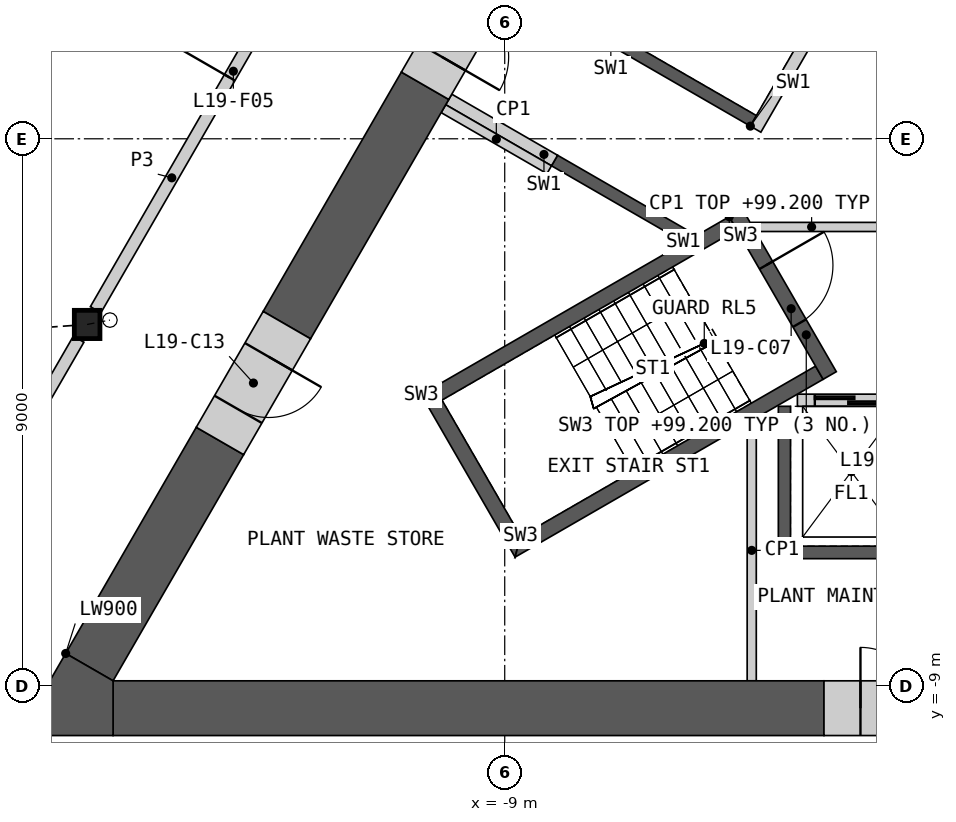
"""IFC4 building model, lengths in metres.
Left out: names, types, materials, properties, quantities, classifications, styles, units other than length and angle.
Written with IfcOpenShell. Run it as: python <this file> out.ifc"""

import sys

from ifc_helpers import new_model, si_unit, direction, frame, frame_2d, origin, origin_2d, place, context, subcontext, project, spatial, polyline, rectangle, i_section, outline, extrude, element, fill, save


model = new_model("IFC4")
c1 = context("Model", 3, precision=1e-05, world=origin(), true_north=direction((0.0, 1.0)))
c2 = subcontext(c1, "Body", "Model", "MODEL_VIEW")
j1 = project(units=[si_unit("LENGTHUNIT", "METRE"), si_unit("PLANEANGLEUNIT", "RADIAN")], contexts=[c1])
p1 = place(None, origin())
s1 = spatial("IfcSite", under=j1, at=p1, CompositionType="ELEMENT")
p2 = place(p1, origin())
s2 = spatial("IfcBuilding", under=s1, at=p2, CompositionType="ELEMENT")
p3 = place(p2, frame((0.0, 0.0, 94.6)))
s3 = spatial("IfcBuildingStorey", under=s2, at=p3, CompositionType="ELEMENT", Elevation=94.6)
p4 = place(p3, frame((-15.868, -3.054, 0.0), z_axis=(0.074782233985, 0.014362473324, 0.997096453128), x_axis=(-0.188610251533, 0.982052021543, 0.0)))
e1 = element("IfcColumn", 1, at=p4, inside=s3, PredefinedType="COLUMN", context=c2, shape_type="SweptSolid", body=[
    extrude(i_section(OverallWidth=0.421, OverallDepth=0.465, WebThickness=0.045, FlangeThickness=0.072, at=origin_2d()), frame((0.0, 0.0, 0.018)), (0.0, 0.0, 1.0), 4.979),
])
p5 = place(p3, origin())
e2 = element("IfcWall", 2, at=p5, inside=s3, PredefinedType="SHEAR", context=c2, shape_type="SweptSolid", body=[
    extrude(outline(polyline([(4.5, -4.4), (4.5, -6.906), (-4.5, -6.906), (-4.5, -4.4), (-4.3, -4.4), (-4.3, -6.7), (-2.3, -6.7), (-2.3, -4.4), (-2.1, -4.4), (-2.1, -6.7), (-0.1, -6.7), (-0.1, -4.4), (0.1, -4.4), (0.1, -6.7), (2.1, -6.7), (2.1, -4.4), (2.3, -4.4), (2.3, -6.7), (4.3, -6.7), (4.3, -4.4), (4.5, -4.4)])), origin(), (0.0, 0.0, 1.0), 4.6),
])
p6 = place(p3, frame((-4.187, -4.3, 0.0), z_axis=(0.0, 0.0, 1.0), x_axis=(1.0, 0.0, 0.0)))
e3 = element("IfcWall", 3, at=p6, inside=s3, PredefinedType="SOLIDWALL", context=c2, shape_type="SweptSolid", body=[
    extrude(rectangle(XDim=8.373, YDim=0.2, at=frame_2d((4.187, 0.0))), origin(), (0.0, 0.0, 1.0), 4.6),
])
p7 = place(p6, frame((0.287, 0.0, 0.0)))
e4 = element("IfcOpeningElement", 4, at=p7, cuts=e3, PredefinedType="OPENING", context=c2, shape_type="SweptSolid", body=[
    extrude(rectangle(XDim=1.2, YDim=2.1, at=frame_2d((0.6, 1.05))), frame((0.0, 0.11, 0.0), z_axis=(0.0, -1.0, 0.0), x_axis=(1.0, 0.0, 0.0)), (0.0, 0.0, 1.0), 0.22),
])
p8 = place(p6, frame((2.387, 0.0, 0.0)))
e5 = element("IfcOpeningElement", 5, at=p8, cuts=e3, PredefinedType="OPENING", context=c2, shape_type="SweptSolid", body=[
    extrude(rectangle(XDim=1.4, YDim=2.1, at=frame_2d((0.7, 1.05))), frame((0.0, 0.11, 0.0), z_axis=(0.0, -1.0, 0.0), x_axis=(1.0, 0.0, 0.0)), (0.0, 0.0, 1.0), 0.22),
])
p9 = place(p6, frame((6.887, 0.0, 0.0)))
e6 = element("IfcOpeningElement", 6, at=p9, cuts=e3, PredefinedType="OPENING", context=c2, shape_type="SweptSolid", body=[
    extrude(rectangle(XDim=1.2, YDim=2.1, at=frame_2d((0.6, 1.05))), frame((0.0, 0.11, 0.0), z_axis=(0.0, -1.0, 0.0), x_axis=(1.0, 0.0, 0.0)), (0.0, 0.0, 1.0), 0.22),
])
p10 = place(p3, origin())
e7 = element("IfcWall", 7, at=p10, inside=s3, PredefinedType="SHEAR", context=c2, shape_type="SweptSolid", body=[
    extrude(outline(polyline([(-6.061, -1.697), (-8.231, -0.444), (-8.131, -0.271), (-5.96, -1.524), (-6.061, -1.697)])), origin(), (0.0, 0.0, 1.0), 4.6),
])
p11 = place(p3, origin())
e8 = element("IfcWall", 8, at=p11, inside=s3, PredefinedType="SHEAR", context=c2, shape_type="SweptSolid", body=[
    extrude(outline(polyline([(-4.96, 0.208), (-7.131, 1.461), (-3.731, 7.35), (-1.561, 6.097), (-1.66, 5.924), (-3.652, 7.074), (-5.752, 3.437), (-3.76, 2.287), (-3.861, 2.113), (-5.852, 3.263), (-6.852, 1.531), (-4.861, 0.381), (-4.96, 0.208)])), origin(), (0.0, 0.0, 1.0), 4.6),
])
p12 = place(p3, frame((-1.631, 5.776, 0.0), z_axis=(0.0, 0.0, 1.0), x_axis=(-0.499992876559, -0.866029516466, 0.0)))
e9 = element("IfcWall", 9, at=p12, inside=s3, PredefinedType="SOLIDWALL", context=c2, shape_type="SweptSolid", body=[
    extrude(rectangle(XDim=6.486, YDim=0.2, at=frame_2d((3.243, 0.0))), origin(), (0.0, 0.0, 1.0), 4.6),
])
p13 = place(p12, frame((1.537, 0.0, 0.0)))
e10 = element("IfcOpeningElement", 10, at=p13, cuts=e9, PredefinedType="OPENING", context=c2, shape_type="SweptSolid", body=[
    extrude(rectangle(XDim=0.9, YDim=2.1, at=frame_2d((0.45, 1.05))), frame((0.0, 0.11, 0.0), z_axis=(0.0, -1.0, 0.0), x_axis=(1.0, 0.0, 0.0)), (0.0, 0.0, 1.0), 0.22),
])
p14 = place(p3, frame((-8.181, -0.357, 0.0), z_axis=(0.0, 0.0, 1.0), x_axis=(-0.866035824272, 0.499981950752, 0.0)))
e11 = element("IfcWall", 11, at=p14, inside=s3, PredefinedType="SHEAR", context=c2, shape_type="SweptSolid", body=[
    extrude(rectangle(XDim=2.009, YDim=0.2, at=frame_2d((1.004, 0.0))), origin(), (0.0, 0.0, 1.0), 4.6),
])
p15 = place(p3, frame((-4.941, -1.45, 0.0), z_axis=(0.0, 0.0, 1.0), x_axis=(1.0, 0.0, 0.0)))
e12 = element("IfcWall", 12, at=p15, inside=s3, PredefinedType="PARTITIONING", context=c2, shape_type="SweptSolid", body=[
    extrude(rectangle(XDim=9.882, YDim=0.15, at=frame_2d((4.941, 0.0))), origin(), (0.0, 0.0, 1.0), 4.6),
])
p16 = place(p15, frame((4.391, 0.0, 0.0)))
e13 = element("IfcOpeningElement", 13, at=p16, cuts=e12, PredefinedType="OPENING", context=c2, shape_type="SweptSolid", body=[
    extrude(rectangle(XDim=1.1, YDim=2.1, at=frame_2d((0.55, 1.05))), frame((0.0, 0.085, 0.0), z_axis=(0.0, -1.0, 0.0), x_axis=(1.0, 0.0, 0.0)), (0.0, 0.0, 1.0), 0.17),
])
p17 = place(p3, origin())
e14 = element("IfcWall", 14, at=p17, inside=s3, PredefinedType="SHEAR", context=c2, shape_type="SweptSolid", body=[
    extrude(outline(polyline([(-5.307, -1.281), (-10.374, -4.206), (-10.032, -4.298), (-5.182, -1.498), (-5.307, -1.281)])), origin(), (0.0, 0.0, 1.0), 4.6),
])
p18 = place(p3, origin())
e15 = element("IfcWall", 15, at=p18, inside=s3, PredefinedType="SHEAR", context=c2, shape_type="SweptSolid", body=[
    extrude(outline(polyline([(-10.374, -4.206), (-8.83, -6.881), (-8.738, -6.539), (-10.032, -4.298), (-10.374, -4.206)])), origin(), (0.0, 0.0, 1.0), 4.6),
])
p19 = place(p3, origin())
e16 = element("IfcWall", 16, at=p19, inside=s3, PredefinedType="SHEAR", context=c2, shape_type="SweptSolid", body=[
    extrude(outline(polyline([(-8.738, -6.539), (-8.83, -6.881), (-3.763, -3.956), (-3.888, -3.739), (-8.738, -6.539)])), origin(), (0.0, 0.0, 1.0), 4.6),
])
p20 = place(p3, frame((-5.199, -1.219, 0.0), z_axis=(0.0, 0.0, 1.0), x_axis=(0.499982516597, -0.866035497597, 0.0)))
e17 = element("IfcWall", 17, at=p20, inside=s3, PredefinedType="SHEAR", context=c2, shape_type="SweptSolid", body=[
    extrude(rectangle(XDim=3.088, YDim=0.25, at=frame_2d((1.544, 0.0))), origin(), (0.0, 0.0, 1.0), 4.6),
])
p21 = place(p20, frame((0.994, 0.0, 0.0)))
e18 = element("IfcOpeningElement", 18, at=p21, cuts=e17, PredefinedType="OPENING", context=c2, shape_type="SweptSolid", body=[
    extrude(rectangle(XDim=1.1, YDim=2.1, at=frame_2d((0.55, 1.05))), frame((0.0, 0.135, 0.0), z_axis=(0.0, -1.0, 0.0), x_axis=(1.0, 0.0, 0.0)), (0.0, 0.0, 1.0), 0.27),
])
p22 = place(p3, frame((-8.268, -0.509, 0.0), z_axis=(0.0, 0.0, 1.0), x_axis=(-0.866035824272, 0.499981950752, 0.0)))
e19 = element("IfcWall", 19, at=p22, inside=s3, PredefinedType="PARTITIONING", context=c2, shape_type="SweptSolid", body=[
    extrude(rectangle(XDim=2.009, YDim=0.15, at=frame_2d((1.004, 0.0))), origin(), (0.0, 0.0, 1.0), 4.6),
])
p23 = place(p3, frame((-4.938, -8.915, 0.0), z_axis=(0.0, 0.0, 1.0), x_axis=(0.0, 1.0, 0.0)))
e20 = element("IfcWall", 20, at=p23, inside=s3, PredefinedType="PARTITIONING", context=c2, shape_type="SweptSolid", body=[
    extrude(rectangle(XDim=4.291, YDim=0.15, at=frame_2d((2.146, 0.0))), origin(), (0.0, 0.0, 1.0), 4.6),
])
p24 = place(p3, frame((-15.441, -9.365, 0.0), z_axis=(0.0, 0.0, 1.0), x_axis=(1.0, 0.0, 0.0)))
e21 = element("IfcWall", 21, at=p24, inside=s3, PredefinedType="SHEAR", context=c2, shape_type="SweptSolid", body=[
    extrude(rectangle(XDim=11.692, YDim=0.9, at=frame_2d((5.846, 0.0))), origin(), (0.0, 0.0, 1.0), 4.6),
])
p25 = place(p3, frame((-10.31, 0.872, 0.0), z_axis=(0.0, 0.0, 1.0), x_axis=(-0.499968858743, -0.866043382451, 0.0)))
e22 = element("IfcWall", 22, at=p25, inside=s3, PredefinedType="SHEAR", context=c2, shape_type="SweptSolid", body=[
    extrude(rectangle(XDim=4.546, YDim=0.9, at=frame_2d((2.273, 0.0))), origin(), (0.0, 0.0, 1.0), 4.6),
])
p26 = place(p3, frame((-13.683, -4.97, 0.0), z_axis=(0.0, 0.0, 1.0), x_axis=(-0.499996331799, -0.866027521611, 0.0)))
e23 = element("IfcWall", 23, at=p26, inside=s3, PredefinedType="SHEAR", context=c2, shape_type="SweptSolid", body=[
    extrude(rectangle(XDim=4.295, YDim=0.9, at=frame_2d((2.148, 0.0))), origin(), (0.0, 0.0, 1.0), 4.6),
])
p27 = place(p3, origin())
e24 = element("IfcWall", 24, at=p27, inside=s3, PredefinedType="SHEAR", context=c2, shape_type="SweptSolid", body=[
    extrude(outline(polyline([(-16.221, -8.465), (-15.441, -8.915), (-15.441, -9.815), (-17.0, -9.815), (-16.221, -8.465)])), origin(), (0.0, 0.0, 1.0), 4.6),
])
p28 = place(p3, frame((-3.75, -9.365, 0.0), z_axis=(0.0, 0.0, 1.0), x_axis=(1.0, 0.0, 0.0)))
e25 = element("IfcWall", 25, at=p28, inside=s3, PredefinedType="SHEAR", context=c2, shape_type="SweptSolid", body=[
    extrude(rectangle(XDim=2.2, YDim=0.9, at=frame_2d((1.1, 0.0))), origin(), (0.0, 0.0, 1.0), 4.6),
])
p29 = place(p28, frame((0.6, 0.0, 0.0)))
e26 = element("IfcOpeningElement", 26, at=p29, cuts=e25, PredefinedType="OPENING", context=c2, shape_type="SweptSolid", body=[
    extrude(rectangle(XDim=1.0, YDim=2.1, at=frame_2d((0.5, 1.05))), frame((0.0, 0.46, 0.0), z_axis=(0.0, -1.0, 0.0), x_axis=(1.0, 0.0, 0.0)), (0.0, 0.0, 1.0), 0.92),
])
p30 = place(p3, frame((-12.583, -3.065, 0.0), z_axis=(0.0, 0.0, 1.0), x_axis=(-0.50002983664, -0.866008176907, 0.0)))
e27 = element("IfcWall", 27, at=p30, inside=s3, PredefinedType="SHEAR", context=c2, shape_type="SweptSolid", body=[
    extrude(rectangle(XDim=2.2, YDim=0.9, at=frame_2d((1.1, 0.0))), origin(), (0.0, 0.0, 1.0), 4.6),
])
p31 = place(p30, frame((0.6, 0.0, 0.0)))
e28 = element("IfcOpeningElement", 28, at=p31, cuts=e27, PredefinedType="OPENING", context=c2, shape_type="SweptSolid", body=[
    extrude(rectangle(XDim=1.0, YDim=2.1, at=frame_2d((0.5, 1.05))), frame((0.0, 0.46, 0.0), z_axis=(0.0, -1.0, 0.0), x_axis=(1.0, 0.0, 0.0)), (0.0, 0.0, 1.0), 0.92),
])
p32 = place(p3, frame((-9.21, 2.777, 0.0), z_axis=(0.0, 0.0, 1.0), x_axis=(-0.500077893725, -0.86598042715, 0.0)))
e29 = element("IfcWall", 29, at=p32, inside=s3, PredefinedType="SHEAR", context=c2, shape_type="SweptSolid", body=[
    extrude(rectangle(XDim=2.2, YDim=0.9, at=frame_2d((1.1, 0.0))), origin(), (0.0, 0.0, 1.0), 4.6),
])
p33 = place(p32, frame((0.55, 0.0, 0.0)))
e30 = element("IfcOpeningElement", 30, at=p33, cuts=e29, PredefinedType="OPENING", context=c2, shape_type="SweptSolid", body=[
    extrude(rectangle(XDim=1.1, YDim=2.1, at=frame_2d((0.55, 1.05))), frame((0.0, 0.46, 0.0), z_axis=(0.0, -1.0, 0.0), x_axis=(1.0, 0.0, 0.0)), (0.0, 0.0, 1.0), 0.92),
])
p34 = place(p3, frame((-15.728, -2.811, 0.0), z_axis=(0.0, 0.0, 1.0), x_axis=(0.49999175339, 0.866030164915, 0.0)))
e31 = element("IfcWall", 31, at=p34, inside=s3, PredefinedType="PARTITIONING", context=c2, shape_type="SweptSolid", body=[
    extrude(rectangle(XDim=10.019, YDim=0.2, at=frame_2d((5.009, 0.0))), origin(), (0.0, 0.0, 1.0), 4.6),
])
p35 = place(p34, frame((4.409, 0.0, 0.0)))
e32 = element("IfcOpeningElement", 32, at=p35, cuts=e31, PredefinedType="OPENING", context=c2, shape_type="SweptSolid", body=[
    extrude(rectangle(XDim=1.2, YDim=2.1, at=frame_2d((0.6, 1.05))), frame((0.0, 0.11, 0.0), z_axis=(0.0, -1.0, 0.0), x_axis=(1.0, 0.0, 0.0)), (0.0, 0.0, 1.0), 0.22),
])
p36 = place(p3, frame((-19.244, -8.902, 0.0), z_axis=(0.0, 0.0, 1.0), x_axis=(0.499984737558, 0.86603421538, 0.0)))
e33 = element("IfcWall", 33, at=p36, inside=s3, PredefinedType="PARTITIONING", context=c2, shape_type="SweptSolid", body=[
    extrude(rectangle(XDim=6.473, YDim=0.2, at=frame_2d((3.236, 0.0))), origin(), (0.0, 0.0, 1.0), 4.6),
])
p37 = place(p7, origin())
e34 = element("IfcDoor", 34, at=p37, inside=s3, OperationType="SLIDING_TO_LEFT", PredefinedType="DOOR", context=c2, shape_type="SweptSolid", body=[
    extrude(rectangle(XDim=1.2, YDim=2.1, at=frame_2d((0.6, 1.05))), frame((0.0, 0.025, 0.0), z_axis=(0.0, -1.0, 0.0), x_axis=(1.0, 0.0, 0.0)), (0.0, 0.0, 1.0), 0.05),
])
fill(e4, e34)
p38 = place(p21, origin())
e35 = element("IfcDoor", 35, at=p38, inside=s3, OperationType="SINGLE_SWING_LEFT", PredefinedType="DOOR", context=c2, shape_type="SweptSolid", body=[
    extrude(rectangle(XDim=1.1, YDim=2.1, at=frame_2d((0.55, 1.05))), frame((0.0, 0.025, 0.0), z_axis=(0.0, -1.0, 0.0), x_axis=(1.0, 0.0, 0.0)), (0.0, 0.0, 1.0), 0.05),
])
fill(e18, e35)
p39 = place(p29, origin())
e36 = element("IfcDoor", 36, at=p39, inside=s3, OperationType="SINGLE_SWING_LEFT", PredefinedType="DOOR", context=c2, shape_type="SweptSolid", body=[
    extrude(rectangle(XDim=1.0, YDim=2.1, at=frame_2d((0.5, 1.05))), frame((0.0, 0.205, 0.0), z_axis=(0.0, -1.0, 0.0), x_axis=(1.0, 0.0, 0.0)), (0.0, 0.0, 1.0), 0.05),
])
fill(e26, e36)
p40 = place(p31, origin())
e37 = element("IfcDoor", 37, at=p40, inside=s3, OperationType="SINGLE_SWING_LEFT", PredefinedType="DOOR", context=c2, shape_type="SweptSolid", body=[
    extrude(rectangle(XDim=1.0, YDim=2.1, at=frame_2d((0.5, 1.05))), frame((0.0, 0.205, 0.0), z_axis=(0.0, -1.0, 0.0), x_axis=(1.0, 0.0, 0.0)), (0.0, 0.0, 1.0), 0.05),
])
fill(e28, e37)
p41 = place(p33, origin())
e38 = element("IfcDoor", 38, at=p41, inside=s3, OperationType="SINGLE_SWING_RIGHT", PredefinedType="DOOR", context=c2, shape_type="SweptSolid", body=[
    extrude(rectangle(XDim=1.1, YDim=2.1, at=frame_2d((0.55, 1.05))), frame((0.0, 0.205, 0.0), z_axis=(0.0, -1.0, 0.0), x_axis=(1.0, 0.0, 0.0)), (0.0, 0.0, 1.0), 0.05),
])
fill(e30, e38)
p42 = place(p35, origin())
e39 = element("IfcDoor", 39, at=p42, inside=s3, OperationType="SINGLE_SWING_LEFT", PredefinedType="DOOR", context=c2, shape_type="SweptSolid", body=[
    extrude(rectangle(XDim=1.2, YDim=2.1, at=frame_2d((0.6, 1.05))), frame((0.0, 0.025, 0.0), z_axis=(0.0, -1.0, 0.0), x_axis=(1.0, 0.0, 0.0)), (0.0, 0.0, 1.0), 0.05),
])
fill(e32, e39)
save(model, sys.argv[1])
